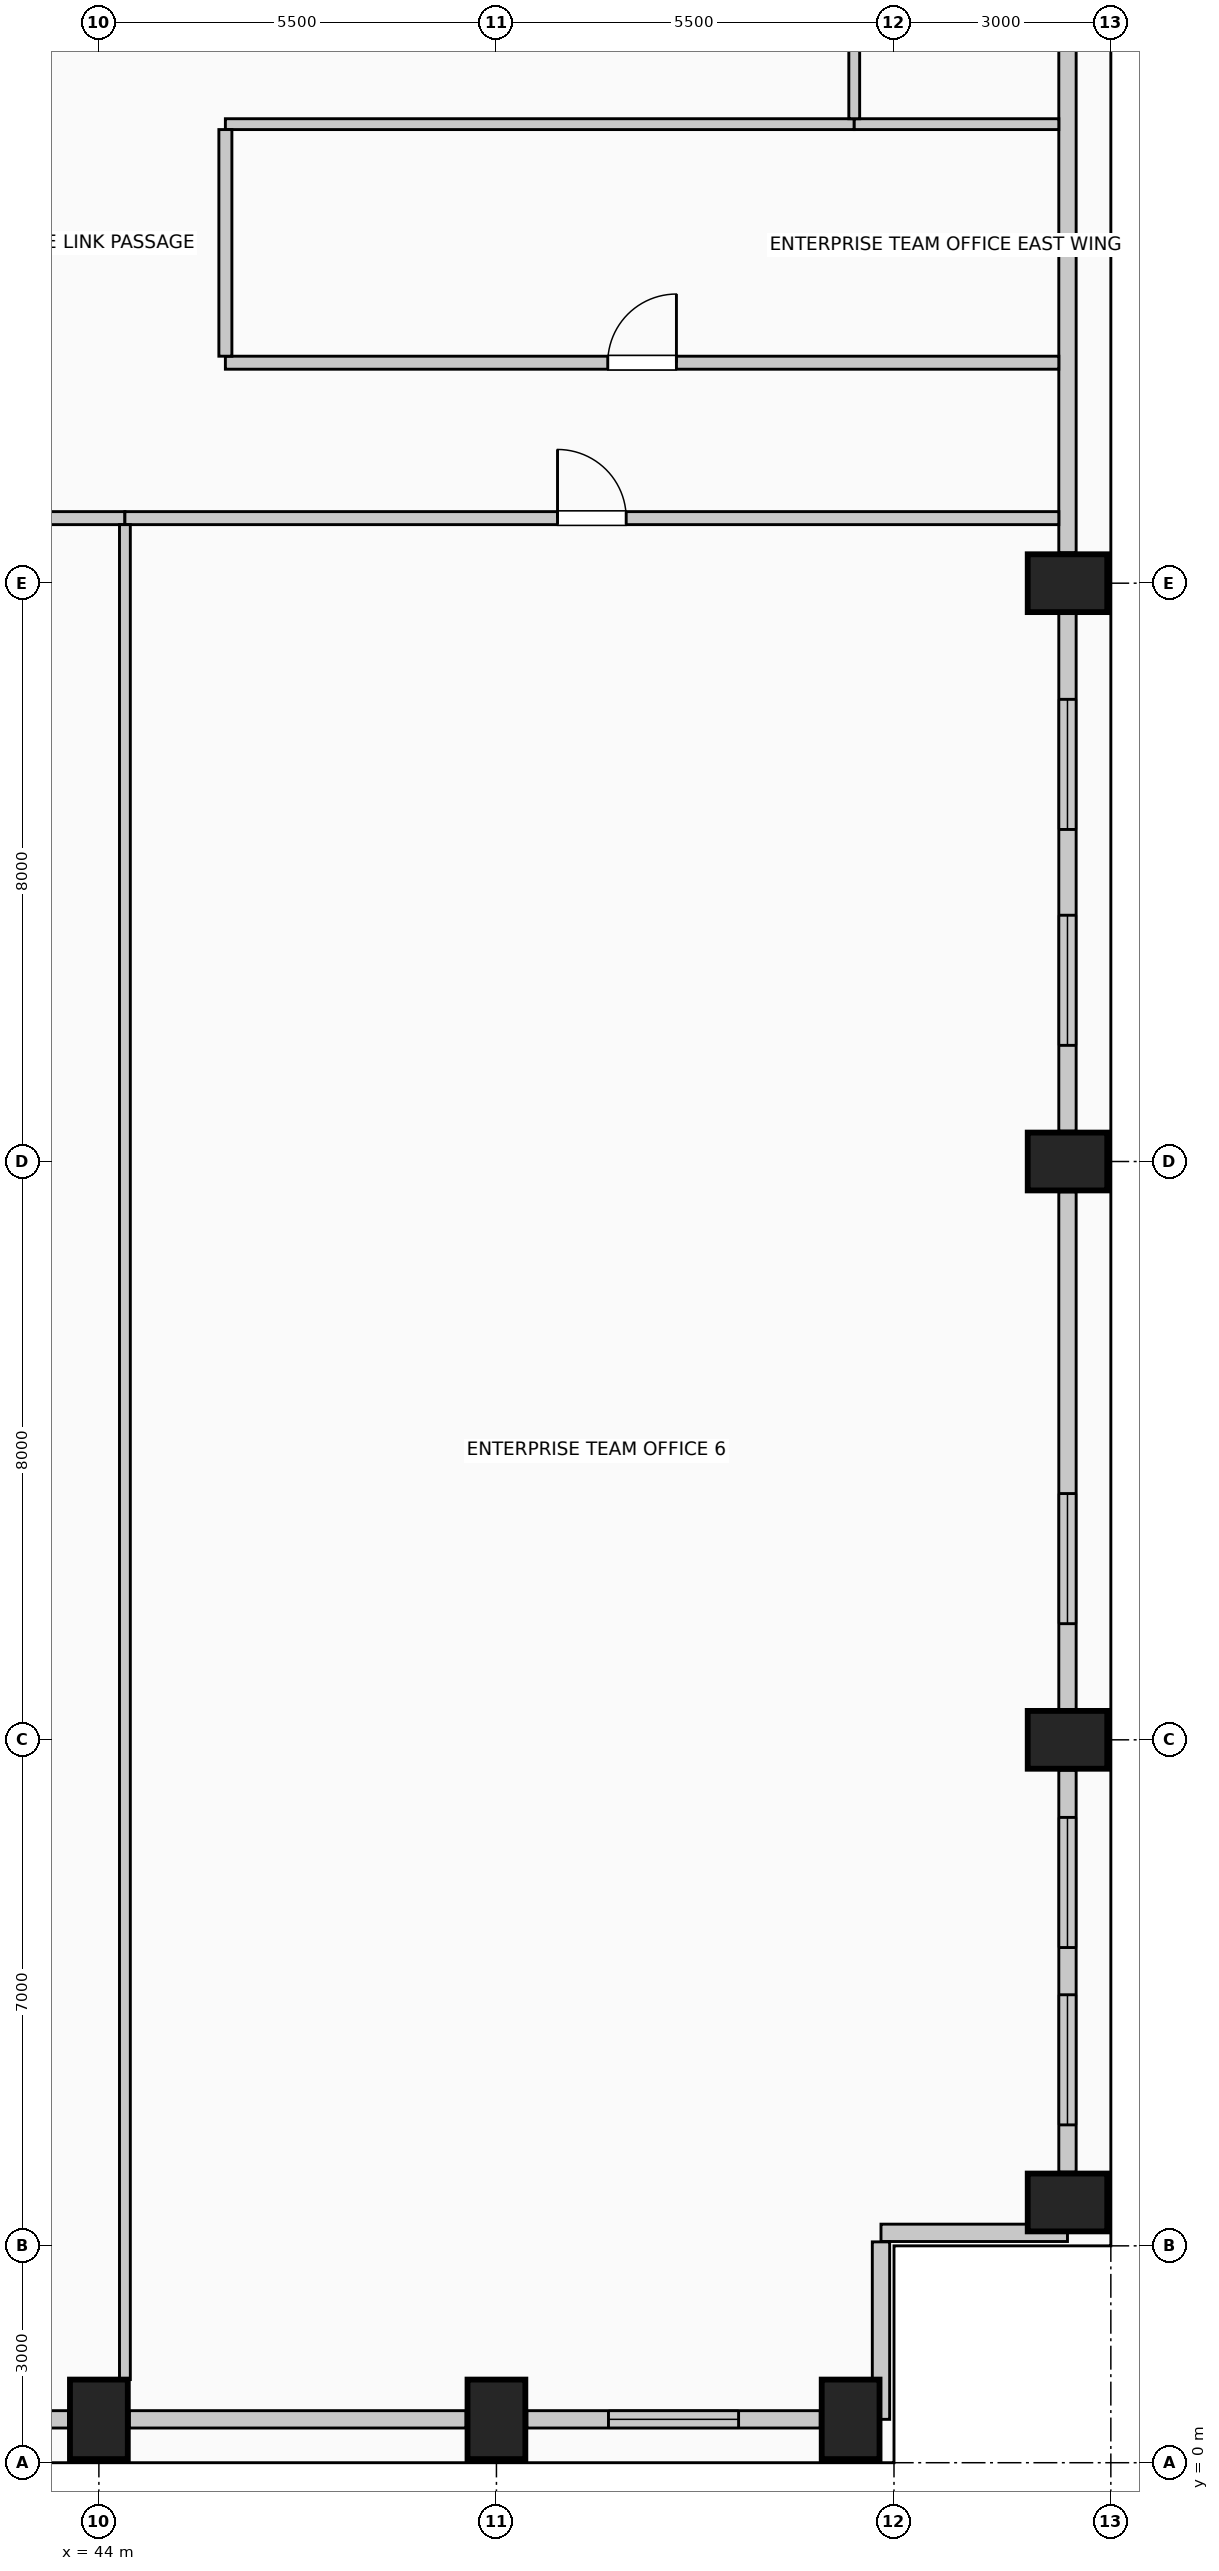
"""IFC4 building model, lengths in metres.
Left out: names, types, materials, properties, quantities, classifications, styles, units other than length and angle.
Written with IfcOpenShell. Run it as: python <this file> out.ifc"""

import sys

from ifc_helpers import new_model, si_unit, direction, frame, frame_2d, origin, origin_2d, place, context, subcontext, project, spatial, rectangle, extrude, element, fill, save


model = new_model("IFC4")
c1 = context("Model", 3, precision=1e-05, world=origin(), true_north=direction((0.0, 1.0)))
c2 = subcontext(c1, "Body", "Model", "MODEL_VIEW")
j1 = project(units=[si_unit("LENGTHUNIT", "METRE"), si_unit("PLANEANGLEUNIT", "RADIAN")], contexts=[c1])
p1 = place(None, origin())
s1 = spatial("IfcSite", under=j1, at=p1, CompositionType="ELEMENT")
p2 = place(p1, origin())
s2 = spatial("IfcBuilding", under=s1, at=p2, CompositionType="ELEMENT")
p3 = place(p2, frame((0.0, 0.0, 174.6)))
s3 = spatial("IfcBuildingStorey", under=s2, at=p3, CompositionType="ELEMENT", Elevation=174.6)
for number, where, z_axis, x_axis in (
    (1, (44.0, 0.6, 0.0), (0.0, 0.0, 1.0), (1.0, 0.0, 0.0)),
    (2, (49.5, 0.6, 0.0), (0.0, 0.0, 1.0), (1.0, 0.0, 0.0)),
    (3, (54.4, 0.6, 0.0), (0.0, 0.0, 1.0), (1.0, 0.0, 0.0)),
    (4, (57.4, 3.6, 0.0), (0.0, 0.0, 1.0), (0.0, 1.0, 0.0)),
    (5, (57.4, 10.0, 0.0), (0.0, 0.0, 1.0), (0.0, 1.0, 0.0)),
    (6, (57.4, 18.0, 0.0), (0.0, 0.0, 1.0), (0.0, 1.0, 0.0)),
    (7, (57.4, 26.0, 0.0), (0.0, 0.0, 1.0), (0.0, 1.0, 0.0)),
):
    element("IfcColumn", number, at=place(p3, frame(where, z_axis=z_axis, x_axis=x_axis)), inside=s3, PredefinedType="COLUMN", context=c2, shape_type="SweptSolid", body=[
        extrude(rectangle(XDim=0.8, YDim=1.1, at=origin_2d()), origin(), (0.0, 0.0, 1.0), 4.0),
    ])
p4 = place(p3, frame((43.58, 0.6, 0.0), z_axis=(0.0, 0.0, 1.0), x_axis=(-1.0, 0.0, 0.0)))
e8 = element("IfcWall", 8, at=p4, inside=s3, PredefinedType="SOLIDWALL", context=c2, shape_type="SweptSolid", body=[
    extrude(rectangle(XDim=1.46, YDim=0.24, at=frame_2d((0.73, 0.0))), origin(), (0.0, 0.0, 1.0), 2.975),
])
p5 = place(p3, frame((49.08, 0.6, 0.0), z_axis=(0.0, 0.0, 1.0), x_axis=(-1.0, 0.0, 0.0)))
e9 = element("IfcWall", 9, at=p5, inside=s3, PredefinedType="SOLIDWALL", context=c2, shape_type="SweptSolid", body=[
    extrude(rectangle(XDim=4.66, YDim=0.24, at=frame_2d((2.33, 0.0))), origin(), (0.0, 0.0, 1.0), 2.975),
])
p6 = place(p3, frame((53.98, 0.6, 0.0), z_axis=(0.0, 0.0, 1.0), x_axis=(-1.0, 0.0, 0.0)))
e10 = element("IfcWall", 10, at=p6, inside=s3, PredefinedType="SOLIDWALL", context=c2, shape_type="SweptSolid", body=[
    extrude(rectangle(XDim=4.06, YDim=0.24, at=frame_2d((2.03, 0.0))), origin(), (0.0, 0.0, 1.0), 2.975),
])
p7 = place(p6, frame((1.13, 0.0, 0.42)))
e11 = element("IfcOpeningElement", 11, at=p7, cuts=e10, PredefinedType="OPENING", context=c2, shape_type="SweptSolid", body=[
    extrude(rectangle(XDim=1.8, YDim=2.2, at=frame_2d((0.9, 1.1))), frame((0.0, 0.13, 0.0), z_axis=(0.0, -1.0, 0.0), x_axis=(1.0, 0.0, 0.0)), (0.0, 0.0, 1.0), 0.26),
])
p8 = place(p3, frame((57.4, 9.58, 0.0), z_axis=(0.0, 0.0, 1.0), x_axis=(0.0, -1.0, 0.0)))
e12 = element("IfcWall", 12, at=p8, inside=s3, PredefinedType="SOLIDWALL", context=c2, shape_type="SweptSolid", body=[
    extrude(rectangle(XDim=5.56, YDim=0.24, at=frame_2d((2.78, 0.0))), origin(), (0.0, 0.0, 1.0), 2.975),
])
p9 = place(p8, frame((0.653, 0.0, 0.42)))
e13 = element("IfcOpeningElement", 13, at=p9, cuts=e12, PredefinedType="OPENING", context=c2, shape_type="SweptSolid", body=[
    extrude(rectangle(XDim=1.8, YDim=2.2, at=frame_2d((0.9, 1.1))), frame((0.0, 0.13, 0.0), z_axis=(0.0, -1.0, 0.0), x_axis=(1.0, 0.0, 0.0)), (0.0, 0.0, 1.0), 0.26),
])
p10 = place(p8, frame((3.107, 0.0, 0.42)))
e14 = element("IfcOpeningElement", 14, at=p10, cuts=e12, PredefinedType="OPENING", context=c2, shape_type="SweptSolid", body=[
    extrude(rectangle(XDim=1.8, YDim=2.2, at=frame_2d((0.9, 1.1))), frame((0.0, 0.13, 0.0), z_axis=(0.0, -1.0, 0.0), x_axis=(1.0, 0.0, 0.0)), (0.0, 0.0, 1.0), 0.26),
])
p11 = place(p3, frame((57.4, 17.58, 0.0), z_axis=(0.0, 0.0, 1.0), x_axis=(0.0, -1.0, 0.0)))
e15 = element("IfcWall", 15, at=p11, inside=s3, PredefinedType="SOLIDWALL", context=c2, shape_type="SweptSolid", body=[
    extrude(rectangle(XDim=7.16, YDim=0.24, at=frame_2d((3.58, 0.0))), origin(), (0.0, 0.0, 1.0), 2.975),
])
p12 = place(p11, frame((4.173, 0.0, 0.42)))
e16 = element("IfcOpeningElement", 16, at=p12, cuts=e15, PredefinedType="OPENING", context=c2, shape_type="SweptSolid", body=[
    extrude(rectangle(XDim=1.8, YDim=2.2, at=frame_2d((0.9, 1.1))), frame((0.0, 0.13, 0.0), z_axis=(0.0, -1.0, 0.0), x_axis=(1.0, 0.0, 0.0)), (0.0, 0.0, 1.0), 0.26),
])
p13 = place(p3, frame((57.4, 25.58, 0.0), z_axis=(0.0, 0.0, 1.0), x_axis=(0.0, -1.0, 0.0)))
e17 = element("IfcWall", 17, at=p13, inside=s3, PredefinedType="SOLIDWALL", context=c2, shape_type="SweptSolid", body=[
    extrude(rectangle(XDim=7.16, YDim=0.24, at=frame_2d((3.58, 0.0))), origin(), (0.0, 0.0, 1.0), 2.975),
])
p14 = place(p13, frame((1.187, 0.0, 0.42)))
e18 = element("IfcOpeningElement", 18, at=p14, cuts=e17, PredefinedType="OPENING", context=c2, shape_type="SweptSolid", body=[
    extrude(rectangle(XDim=1.8, YDim=2.2, at=frame_2d((0.9, 1.1))), frame((0.0, 0.13, 0.0), z_axis=(0.0, -1.0, 0.0), x_axis=(1.0, 0.0, 0.0)), (0.0, 0.0, 1.0), 0.26),
])
p15 = place(p13, frame((4.173, 0.0, 0.42)))
e19 = element("IfcOpeningElement", 19, at=p15, cuts=e17, PredefinedType="OPENING", context=c2, shape_type="SweptSolid", body=[
    extrude(rectangle(XDim=1.8, YDim=2.2, at=frame_2d((0.9, 1.1))), frame((0.0, 0.13, 0.0), z_axis=(0.0, -1.0, 0.0), x_axis=(1.0, 0.0, 0.0)), (0.0, 0.0, 1.0), 0.26),
])
p16 = place(p3, frame((57.4, 33.58, 0.0), z_axis=(0.0, 0.0, 1.0), x_axis=(0.0, -1.0, 0.0)))
e20 = element("IfcWall", 20, at=p16, inside=s3, PredefinedType="SOLIDWALL", context=c2, shape_type="SweptSolid", body=[
    extrude(rectangle(XDim=7.16, YDim=0.24, at=frame_2d((3.58, 0.0))), origin(), (0.0, 0.0, 1.0), 2.975),
])
p17 = place(p3, frame((57.4, 3.18, 0.0), z_axis=(0.0, 0.0, 1.0), x_axis=(-1.0, 0.0, 0.0)))
e21 = element("IfcWall", 21, at=p17, inside=s3, PredefinedType="SOLIDWALL", context=c2, shape_type="SweptSolid", body=[
    extrude(rectangle(XDim=2.58, YDim=0.24, at=frame_2d((1.29, 0.0))), origin(), (0.0, 0.0, 1.0), 3.725),
])
p18 = place(p3, frame((54.82, 3.055, 0.0), z_axis=(0.0, 0.0, 1.0), x_axis=(0.0, -1.0, 0.0)))
e22 = element("IfcWall", 22, at=p18, inside=s3, PredefinedType="SOLIDWALL", context=c2, shape_type="SweptSolid", body=[
    extrude(rectangle(XDim=2.455, YDim=0.24, at=frame_2d((1.228, 0.0))), origin(), (0.0, 0.0, 1.0), 3.725),
])
p19 = place(p3, frame((33.36, 26.9, 0.0), z_axis=(0.0, 0.0, 1.0), x_axis=(1.0, 0.0, 0.0)))
e23 = element("IfcWall", 23, at=p19, inside=s3, PredefinedType="PARTITIONING", context=c2, shape_type="SweptSolid", body=[
    extrude(rectangle(XDim=11.0, YDim=0.18, at=frame_2d((5.5, 0.0))), origin(), (0.0, 0.0, 1.0), 3.725),
])
p20 = place(p19, frame((4.975, 0.0, 0.0)))
e24 = element("IfcOpeningElement", 24, at=p20, cuts=e23, PredefinedType="OPENING", context=c2, shape_type="SweptSolid", body=[
    extrude(rectangle(XDim=1.05, YDim=2.15, at=frame_2d((0.525, 1.075))), frame((0.0, 0.1, 0.0), z_axis=(0.0, -1.0, 0.0), x_axis=(1.0, 0.0, 0.0)), (0.0, 0.0, 1.0), 0.2),
])
p21 = place(p3, frame((44.36, 26.9, 0.0), z_axis=(0.0, 0.0, 1.0), x_axis=(1.0, 0.0, 0.0)))
e25 = element("IfcWall", 25, at=p21, inside=s3, PredefinedType="PARTITIONING", context=c2, shape_type="SweptSolid", body=[
    extrude(rectangle(XDim=12.92, YDim=0.18, at=frame_2d((6.46, 0.0))), origin(), (0.0, 0.0, 1.0), 3.725),
])
p22 = place(p21, frame((5.985, 0.0, 0.0)))
e26 = element("IfcOpeningElement", 26, at=p22, cuts=e25, PredefinedType="OPENING", context=c2, shape_type="SweptSolid", body=[
    extrude(rectangle(XDim=0.95, YDim=2.15, at=frame_2d((0.475, 1.075))), frame((0.0, 0.1, 0.0), z_axis=(0.0, -1.0, 0.0), x_axis=(1.0, 0.0, 0.0)), (0.0, 0.0, 1.0), 0.2),
])
p23 = place(p3, frame((45.75, 29.05, 0.0), z_axis=(0.0, 0.0, 1.0), x_axis=(1.0, 0.0, 0.0)))
e27 = element("IfcWall", 27, at=p23, inside=s3, PredefinedType="PARTITIONING", context=c2, shape_type="SweptSolid", body=[
    extrude(rectangle(XDim=11.53, YDim=0.18, at=frame_2d((5.765, 0.0))), origin(), (0.0, 0.0, 1.0), 3.725),
])
p24 = place(p23, frame((5.29, 0.0, 0.0)))
e28 = element("IfcOpeningElement", 28, at=p24, cuts=e27, PredefinedType="OPENING", context=c2, shape_type="SweptSolid", body=[
    extrude(rectangle(XDim=0.95, YDim=2.15, at=frame_2d((0.475, 1.075))), frame((0.0, 0.1, 0.0), z_axis=(0.0, -1.0, 0.0), x_axis=(1.0, 0.0, 0.0)), (0.0, 0.0, 1.0), 0.2),
])
p25 = place(p3, frame((45.75, 32.35, 0.0), z_axis=(0.0, 0.0, 1.0), x_axis=(1.0, 0.0, 0.0)))
e29 = element("IfcWall", 29, at=p25, inside=s3, PredefinedType="PARTITIONING", context=c2, shape_type="SweptSolid", body=[
    extrude(rectangle(XDim=8.7, YDim=0.15, at=frame_2d((4.35, 0.0))), origin(), (0.0, 0.0, 1.0), 3.725),
])
p26 = place(p3, frame((54.45, 32.35, 0.0), z_axis=(0.0, 0.0, 1.0), x_axis=(1.0, 0.0, 0.0)))
e30 = element("IfcWall", 30, at=p26, inside=s3, PredefinedType="PARTITIONING", context=c2, shape_type="SweptSolid", body=[
    extrude(rectangle(XDim=2.83, YDim=0.15, at=frame_2d((1.415, 0.0))), origin(), (0.0, 0.0, 1.0), 3.725),
])
p27 = place(p3, frame((44.36, 1.15, 0.0), z_axis=(0.0, 0.0, 1.0), x_axis=(0.0, 1.0, 0.0)))
e31 = element("IfcWall", 31, at=p27, inside=s3, PredefinedType="PARTITIONING", context=c2, shape_type="SweptSolid", body=[
    extrude(rectangle(XDim=25.66, YDim=0.15, at=frame_2d((12.83, 0.0))), origin(), (0.0, 0.0, 1.0), 3.725),
])
p28 = place(p3, frame((45.75, 29.14, 0.0), z_axis=(0.0, 0.0, 1.0), x_axis=(0.0, 1.0, 0.0)))
e32 = element("IfcWall", 32, at=p28, inside=s3, PredefinedType="PARTITIONING", context=c2, shape_type="SweptSolid", body=[
    extrude(rectangle(XDim=3.135, YDim=0.18, at=frame_2d((1.567, 0.0))), origin(), (0.0, 0.0, 1.0), 3.725),
])
p29 = place(p3, frame((54.45, 32.425, 0.0), z_axis=(0.0, 0.0, 1.0), x_axis=(0.0, 1.0, 0.0)))
e33 = element("IfcWall", 33, at=p29, inside=s3, PredefinedType="PARTITIONING", context=c2, shape_type="SweptSolid", body=[
    extrude(rectangle(XDim=1.725, YDim=0.15, at=frame_2d((0.862, 0.0))), origin(), (0.0, 0.0, 1.0), 3.725),
])
p30 = place(p7, origin())
e34 = element("IfcWindow", 34, at=p30, inside=s3, PartitioningType="SINGLE_PANEL", PredefinedType="WINDOW", context=c2, shape_type="SweptSolid", body=[
    extrude(rectangle(XDim=1.8, YDim=2.2, at=frame_2d((0.9, 1.1))), frame((0.0, 0.03, 0.0), z_axis=(0.0, -1.0, 0.0), x_axis=(1.0, 0.0, 0.0)), (0.0, 0.0, 1.0), 0.06),
])
fill(e11, e34)
p31 = place(p9, origin())
e35 = element("IfcWindow", 35, at=p31, inside=s3, PartitioningType="SINGLE_PANEL", PredefinedType="WINDOW", context=c2, shape_type="SweptSolid", body=[
    extrude(rectangle(XDim=1.8, YDim=2.2, at=frame_2d((0.9, 1.1))), frame((0.0, 0.03, 0.0), z_axis=(0.0, -1.0, 0.0), x_axis=(1.0, 0.0, 0.0)), (0.0, 0.0, 1.0), 0.06),
])
fill(e13, e35)
p32 = place(p10, origin())
e36 = element("IfcWindow", 36, at=p32, inside=s3, PartitioningType="SINGLE_PANEL", PredefinedType="WINDOW", context=c2, shape_type="SweptSolid", body=[
    extrude(rectangle(XDim=1.8, YDim=2.2, at=frame_2d((0.9, 1.1))), frame((0.0, 0.03, 0.0), z_axis=(0.0, -1.0, 0.0), x_axis=(1.0, 0.0, 0.0)), (0.0, 0.0, 1.0), 0.06),
])
fill(e14, e36)
p33 = place(p12, origin())
e37 = element("IfcWindow", 37, at=p33, inside=s3, PartitioningType="SINGLE_PANEL", PredefinedType="WINDOW", context=c2, shape_type="SweptSolid", body=[
    extrude(rectangle(XDim=1.8, YDim=2.2, at=frame_2d((0.9, 1.1))), frame((0.0, 0.03, 0.0), z_axis=(0.0, -1.0, 0.0), x_axis=(1.0, 0.0, 0.0)), (0.0, 0.0, 1.0), 0.06),
])
fill(e16, e37)
p34 = place(p14, origin())
e38 = element("IfcWindow", 38, at=p34, inside=s3, PartitioningType="SINGLE_PANEL", PredefinedType="WINDOW", context=c2, shape_type="SweptSolid", body=[
    extrude(rectangle(XDim=1.8, YDim=2.2, at=frame_2d((0.9, 1.1))), frame((0.0, 0.03, 0.0), z_axis=(0.0, -1.0, 0.0), x_axis=(1.0, 0.0, 0.0)), (0.0, 0.0, 1.0), 0.06),
])
fill(e18, e38)
p35 = place(p15, origin())
e39 = element("IfcWindow", 39, at=p35, inside=s3, PartitioningType="SINGLE_PANEL", PredefinedType="WINDOW", context=c2, shape_type="SweptSolid", body=[
    extrude(rectangle(XDim=1.8, YDim=2.2, at=frame_2d((0.9, 1.1))), frame((0.0, 0.03, 0.0), z_axis=(0.0, -1.0, 0.0), x_axis=(1.0, 0.0, 0.0)), (0.0, 0.0, 1.0), 0.06),
])
fill(e19, e39)
p36 = place(p22, origin())
e40 = element("IfcDoor", 40, at=p36, inside=s3, OperationType="SINGLE_SWING_LEFT", PredefinedType="DOOR", context=c2, shape_type="SweptSolid", body=[
    extrude(rectangle(XDim=0.95, YDim=2.15, at=frame_2d((0.475, 1.075))), frame((0.0, 0.025, 0.0), z_axis=(0.0, -1.0, 0.0), x_axis=(1.0, 0.0, 0.0)), (0.0, 0.0, 1.0), 0.05),
])
fill(e26, e40)
p37 = place(p24, origin())
e41 = element("IfcDoor", 41, at=p37, inside=s3, OperationType="SINGLE_SWING_RIGHT", PredefinedType="DOOR", context=c2, shape_type="SweptSolid", body=[
    extrude(rectangle(XDim=0.95, YDim=2.15, at=frame_2d((0.475, 1.075))), frame((0.0, 0.025, 0.0), z_axis=(0.0, -1.0, 0.0), x_axis=(1.0, 0.0, 0.0)), (0.0, 0.0, 1.0), 0.05),
])
fill(e28, e41)
save(model, sys.argv[1])
